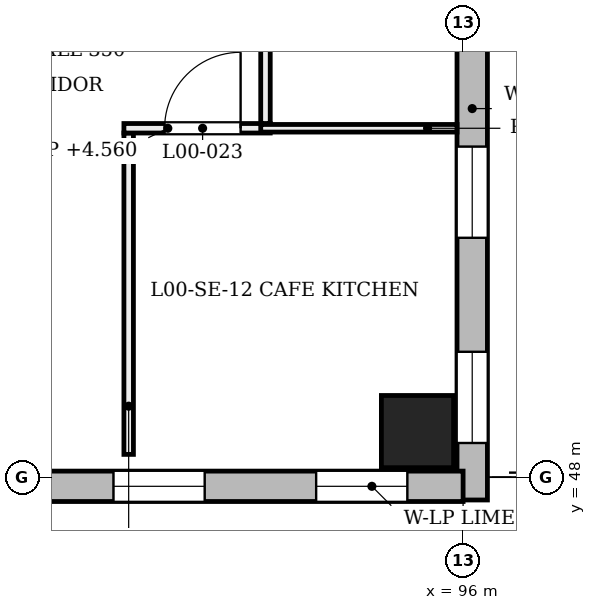
"""IFC4 building model, lengths in metres.
Left out: names, types, materials, properties, quantities, classifications, styles, units other than length and angle.
Written with IfcOpenShell. Run it as: python <this file> out.ifc"""

import sys

from ifc_helpers import new_model, si_unit, direction, frame, frame_2d, origin, origin_2d, place, context, subcontext, project, spatial, rectangle, extrude, element, fill, save


model = new_model("IFC4")
c1 = context("Model", 3, precision=1e-05, world=origin(), true_north=direction((0.0, 1.0)))
c2 = subcontext(c1, "Body", "Model", "MODEL_VIEW")
j1 = project(units=[si_unit("LENGTHUNIT", "METRE"), si_unit("PLANEANGLEUNIT", "RADIAN")], contexts=[c1])
p1 = place(None, origin())
s1 = spatial("IfcSite", under=j1, at=p1, CompositionType="ELEMENT")
p2 = place(p1, origin())
s2 = spatial("IfcBuilding", under=s1, at=p2, CompositionType="ELEMENT")
p3 = place(p2, origin())
s3 = spatial("IfcBuildingStorey", under=s2, at=p3, CompositionType="ELEMENT", Elevation=0.0)
p4 = place(p3, frame((95.4, 48.6, 0.0), z_axis=(0.0, 0.0, 1.0), x_axis=(1.0, 0.0, 0.0)))
e1 = element("IfcColumn", 1, at=p4, inside=s3, PredefinedType="COLUMN", context=c2, shape_type="SweptSolid", body=[
    extrude(rectangle(XDim=0.95, YDim=0.95, at=origin_2d()), origin(), (0.0, 0.0, 1.0), 4.8),
])
p5 = place(p3, frame((96.12, 47.7, 0.0), z_axis=(0.0, 0.0, 1.0), x_axis=(0.0, 1.0, 0.0)))
e2 = element("IfcWall", 2, at=p5, inside=s3, PredefinedType="SOLIDWALL", context=c2, shape_type="SweptSolid", body=[
    extrude(rectangle(XDim=16.575, YDim=0.4, at=frame_2d((8.288, 0.0))), origin(), (0.0, 0.0, 1.0), 3.9),
])
p6 = place(p5, frame((0.75, 0.0, 1.9)))
e3 = element("IfcOpeningElement", 3, at=p6, cuts=e2, PredefinedType="OPENING", context=c2, shape_type="SweptSolid", body=[
    extrude(rectangle(XDim=1.2, YDim=1.5, at=frame_2d((0.6, 0.75))), frame((0.0, 0.21, 0.0), z_axis=(0.0, -1.0, 0.0), x_axis=(1.0, 0.0, 0.0)), (0.0, 0.0, 1.0), 0.42),
])
p7 = place(p5, frame((3.45, 0.0, 1.9)))
e4 = element("IfcOpeningElement", 4, at=p7, cuts=e2, PredefinedType="OPENING", context=c2, shape_type="SweptSolid", body=[
    extrude(rectangle(XDim=1.2, YDim=1.5, at=frame_2d((0.6, 0.75))), frame((0.0, 0.21, 0.0), z_axis=(0.0, -1.0, 0.0), x_axis=(1.0, 0.0, 0.0)), (0.0, 0.0, 1.0), 0.42),
])
p8 = place(p5, frame((6.15, 0.0, 1.9)))
e5 = element("IfcOpeningElement", 5, at=p8, cuts=e2, PredefinedType="OPENING", context=c2, shape_type="SweptSolid", body=[
    extrude(rectangle(XDim=1.2, YDim=1.5, at=frame_2d((0.6, 0.75))), frame((0.0, 0.21, 0.0), z_axis=(0.0, -1.0, 0.0), x_axis=(1.0, 0.0, 0.0)), (0.0, 0.0, 1.0), 0.42),
])
p9 = place(p5, frame((8.85, 0.0, 1.9)))
e6 = element("IfcOpeningElement", 6, at=p9, cuts=e2, PredefinedType="OPENING", context=c2, shape_type="SweptSolid", body=[
    extrude(rectangle(XDim=1.2, YDim=1.5, at=frame_2d((0.6, 0.75))), frame((0.0, 0.21, 0.0), z_axis=(0.0, -1.0, 0.0), x_axis=(1.0, 0.0, 0.0)), (0.0, 0.0, 1.0), 0.42),
])
p10 = place(p5, frame((11.55, 0.0, 1.9)))
e7 = element("IfcOpeningElement", 7, at=p10, cuts=e2, PredefinedType="OPENING", context=c2, shape_type="SweptSolid", body=[
    extrude(rectangle(XDim=1.2, YDim=1.5, at=frame_2d((0.6, 0.75))), frame((0.0, 0.21, 0.0), z_axis=(0.0, -1.0, 0.0), x_axis=(1.0, 0.0, 0.0)), (0.0, 0.0, 1.0), 0.42),
])
p11 = place(p5, frame((14.25, 0.0, 1.9)))
e8 = element("IfcOpeningElement", 8, at=p11, cuts=e2, PredefinedType="OPENING", context=c2, shape_type="SweptSolid", body=[
    extrude(rectangle(XDim=1.2, YDim=1.5, at=frame_2d((0.6, 0.75))), frame((0.0, 0.21, 0.0), z_axis=(0.0, -1.0, 0.0), x_axis=(1.0, 0.0, 0.0)), (0.0, 0.0, 1.0), 0.42),
])
p12 = place(p3, frame((88.0, 47.88, 0.0), z_axis=(0.0, 0.0, 1.0), x_axis=(1.0, 0.0, 0.0)))
e9 = element("IfcWall", 9, at=p12, inside=s3, PredefinedType="SOLIDWALL", context=c2, shape_type="SweptSolid", body=[
    extrude(rectangle(XDim=8.0, YDim=0.4, at=frame_2d((4.0, 0.0))), origin(), (0.0, 0.0, 1.0), 3.9),
])
p13 = place(p12, frame((0.733, 0.0, 1.9)))
e10 = element("IfcOpeningElement", 10, at=p13, cuts=e9, PredefinedType="OPENING", context=c2, shape_type="SweptSolid", body=[
    extrude(rectangle(XDim=1.2, YDim=1.5, at=frame_2d((0.6, 0.75))), frame((0.0, 0.21, 0.0), z_axis=(0.0, -1.0, 0.0), x_axis=(1.0, 0.0, 0.0)), (0.0, 0.0, 1.0), 0.42),
])
p14 = place(p12, frame((3.4, 0.0, 1.9)))
e11 = element("IfcOpeningElement", 11, at=p14, cuts=e9, PredefinedType="OPENING", context=c2, shape_type="SweptSolid", body=[
    extrude(rectangle(XDim=1.2, YDim=1.5, at=frame_2d((0.6, 0.75))), frame((0.0, 0.21, 0.0), z_axis=(0.0, -1.0, 0.0), x_axis=(1.0, 0.0, 0.0)), (0.0, 0.0, 1.0), 0.42),
])
p15 = place(p12, frame((6.067, 0.0, 1.9)))
e12 = element("IfcOpeningElement", 12, at=p15, cuts=e9, PredefinedType="OPENING", context=c2, shape_type="SweptSolid", body=[
    extrude(rectangle(XDim=1.2, YDim=1.5, at=frame_2d((0.6, 0.75))), frame((0.0, 0.21, 0.0), z_axis=(0.0, -1.0, 0.0), x_axis=(1.0, 0.0, 0.0)), (0.0, 0.0, 1.0), 0.42),
])
p16 = place(p3, frame((91.6, 48.3, 0.0), z_axis=(0.0, 0.0, 1.0), x_axis=(0.0, 1.0, 0.0)))
e13 = element("IfcWall", 13, at=p16, inside=s3, PredefinedType="PARTITIONING", context=c2, shape_type="SweptSolid", body=[
    extrude(rectangle(XDim=4.229, YDim=0.125, at=frame_2d((2.114, 0.0))), origin(), (0.0, 0.0, 1.0), 3.98),
])
p17 = place(p3, frame((91.538, 52.591, 0.0), z_axis=(0.0, 0.0, 1.0), x_axis=(1.0, 0.0, 0.0)))
e14 = element("IfcWall", 14, at=p17, inside=s3, PredefinedType="PARTITIONING", context=c2, shape_type="SweptSolid", body=[
    extrude(rectangle(XDim=1.925, YDim=0.125, at=frame_2d((0.962, 0.0))), origin(), (0.0, 0.0, 1.0), 4.56),
])
p18 = place(p17, frame((0.535, 0.0, 0.0)))
e15 = element("IfcOpeningElement", 15, at=p18, cuts=e14, PredefinedType="OPENING", context=c2, shape_type="SweptSolid", body=[
    extrude(rectangle(XDim=1.0, YDim=2.1, at=frame_2d((0.5, 1.05))), frame((0.0, 0.073, 0.0), z_axis=(0.0, -1.0, 0.0), x_axis=(1.0, 0.0, 0.0)), (0.0, 0.0, 1.0), 0.145),
])
p19 = place(p3, frame((93.337, 52.591, 0.0), z_axis=(0.0, 0.0, 1.0), x_axis=(1.0, 0.0, 0.0)))
e16 = element("IfcWall", 16, at=p19, inside=s3, PredefinedType="PARTITIONING", context=c2, shape_type="SweptSolid", body=[
    extrude(rectangle(XDim=2.583, YDim=0.1, at=frame_2d((1.291, 0.0))), origin(), (0.0, 0.0, 1.0), 3.88),
])
p20 = place(p3, frame((93.4, 52.654, 0.0), z_axis=(0.0, 0.0, 1.0), x_axis=(0.0, 1.0, 0.0)))
e17 = element("IfcWall", 17, at=p20, inside=s3, PredefinedType="PARTITIONING", context=c2, shape_type="SweptSolid", body=[
    extrude(rectangle(XDim=6.135, YDim=0.125, at=frame_2d((3.068, 0.0))), origin(), (0.0, 0.0, 1.0), 3.98),
])
p21 = place(p20, frame((1.052, 0.0, 0.0)))
e18 = element("IfcOpeningElement", 18, at=p21, cuts=e17, PredefinedType="OPENING", context=c2, shape_type="SweptSolid", body=[
    extrude(rectangle(XDim=0.9, YDim=2.1, at=frame_2d((0.45, 1.05))), frame((0.0, 0.073, 0.0), z_axis=(0.0, -1.0, 0.0), x_axis=(1.0, 0.0, 0.0)), (0.0, 0.0, 1.0), 0.145),
])
p22 = place(p20, frame((4.183, 0.0, 0.0)))
e19 = element("IfcOpeningElement", 19, at=p22, cuts=e17, PredefinedType="OPENING", context=c2, shape_type="SweptSolid", body=[
    extrude(rectangle(XDim=0.9, YDim=2.1, at=frame_2d((0.45, 1.05))), frame((0.0, 0.073, 0.0), z_axis=(0.0, -1.0, 0.0), x_axis=(1.0, 0.0, 0.0)), (0.0, 0.0, 1.0), 0.145),
])
p23 = place(p6, origin())
e20 = element("IfcWindow", 20, at=p23, inside=s3, PartitioningType="SINGLE_PANEL", PredefinedType="WINDOW", context=c2, shape_type="SweptSolid", body=[
    extrude(rectangle(XDim=1.2, YDim=1.5, at=frame_2d((0.6, 0.75))), frame((0.0, 0.03, 0.0), z_axis=(0.0, -1.0, 0.0), x_axis=(1.0, 0.0, 0.0)), (0.0, 0.0, 1.0), 0.06),
])
fill(e3, e20)
p24 = place(p7, origin())
e21 = element("IfcWindow", 21, at=p24, inside=s3, PartitioningType="SINGLE_PANEL", PredefinedType="WINDOW", context=c2, shape_type="SweptSolid", body=[
    extrude(rectangle(XDim=1.2, YDim=1.5, at=frame_2d((0.6, 0.75))), frame((0.0, 0.03, 0.0), z_axis=(0.0, -1.0, 0.0), x_axis=(1.0, 0.0, 0.0)), (0.0, 0.0, 1.0), 0.06),
])
fill(e4, e21)
p25 = place(p14, origin())
e22 = element("IfcWindow", 22, at=p25, inside=s3, PartitioningType="SINGLE_PANEL", PredefinedType="WINDOW", context=c2, shape_type="SweptSolid", body=[
    extrude(rectangle(XDim=1.2, YDim=1.5, at=frame_2d((0.6, 0.75))), frame((0.0, 0.03, 0.0), z_axis=(0.0, -1.0, 0.0), x_axis=(1.0, 0.0, 0.0)), (0.0, 0.0, 1.0), 0.06),
])
fill(e11, e22)
p26 = place(p15, origin())
e23 = element("IfcWindow", 23, at=p26, inside=s3, PartitioningType="SINGLE_PANEL", PredefinedType="WINDOW", context=c2, shape_type="SweptSolid", body=[
    extrude(rectangle(XDim=1.2, YDim=1.5, at=frame_2d((0.6, 0.75))), frame((0.0, 0.03, 0.0), z_axis=(0.0, -1.0, 0.0), x_axis=(1.0, 0.0, 0.0)), (0.0, 0.0, 1.0), 0.06),
])
fill(e12, e23)
p27 = place(p18, frame((1.0, 0.0, 0.0), z_axis=(0.0, 0.0, 1.0), x_axis=(-1.0, 0.0, 0.0)))
e24 = element("IfcDoor", 24, at=p27, inside=s3, OperationType="SINGLE_SWING_RIGHT", PredefinedType="DOOR", context=c2, shape_type="SweptSolid", body=[
    extrude(rectangle(XDim=1.0, YDim=2.1, at=frame_2d((0.5, 1.05))), frame((0.0, 0.025, 0.0), z_axis=(0.0, -1.0, 0.0), x_axis=(1.0, 0.0, 0.0)), (0.0, 0.0, 1.0), 0.05),
])
fill(e15, e24)
save(model, sys.argv[1])
